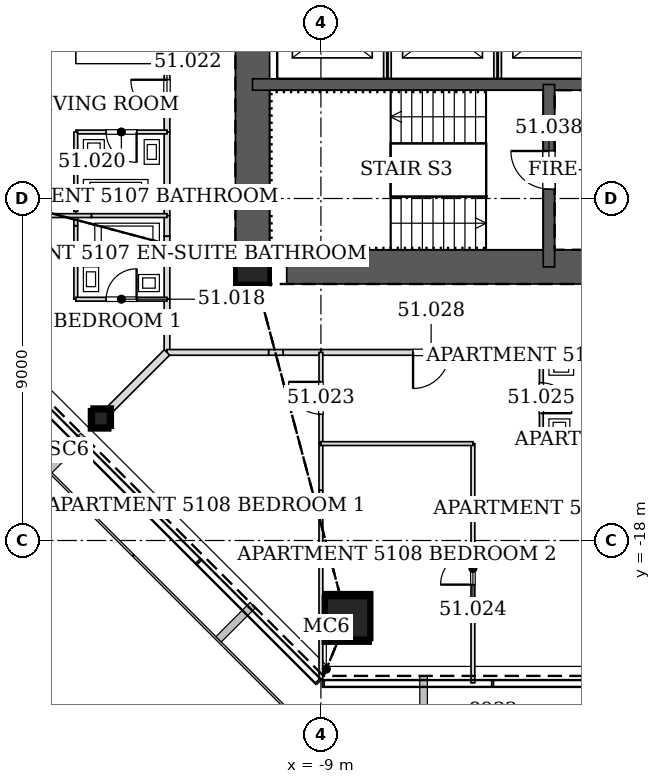
"""IFC4 building model, lengths in metres.
Left out: names, types, materials, properties, quantities, classifications, styles, units other than length and angle.
Written with IfcOpenShell. Run it as: python <this file> out.ifc"""

import sys

from ifc_helpers import new_model, si_unit, direction, frame, frame_2d, origin, origin_2d, place, context, subcontext, project, spatial, rectangle, hollow_rectangle, extrude, element, fill, save


model = new_model("IFC4")
c1 = context("Model", 3, precision=1e-05, world=origin(), true_north=direction((0.0, 1.0)))
c2 = subcontext(c1, "Body", "Model", "MODEL_VIEW")
j1 = project(units=[si_unit("LENGTHUNIT", "METRE"), si_unit("PLANEANGLEUNIT", "RADIAN")], contexts=[c1])
p1 = place(None, origin())
s1 = spatial("IfcSite", under=j1, at=p1, CompositionType="ELEMENT")
p2 = place(p1, origin())
s2 = spatial("IfcBuilding", under=s1, at=p2, CompositionType="ELEMENT")
p3 = place(p2, frame((0.0, 0.0, 221.0)))
s3 = spatial("IfcBuildingStorey", under=s2, at=p3, CompositionType="ELEMENT", Elevation=221.0)
p4 = place(p3, frame((-8.319, -20.085, 0.0), z_axis=(0.01169924247, 0.02827915051, 0.999531598986), x_axis=(-0.924045401938, 0.382282742426, 0.0)))
e1 = element("IfcColumn", 1, at=p4, inside=s3, PredefinedType="COLUMN", context=c2, shape_type="SweptSolid", body=[
    extrude(hollow_rectangle(XDim=1.2, YDim=1.2, WallThickness=0.055, at=origin_2d()), origin(), (0.0, 0.0, 1.0), 3.402),
])
p5 = place(p3, frame((-14.823, -14.823, 0.0), z_axis=(0.01995470925, 0.01995470925, 0.999601730269), x_axis=(-0.707106781187, 0.707106781187, 0.0)))
e2 = element("IfcColumn", 2, at=p5, inside=s3, PredefinedType="COLUMN", context=c2, shape_type="SweptSolid", body=[
    extrude(hollow_rectangle(XDim=0.5, YDim=0.5, WallThickness=0.025, at=origin_2d()), origin(), (0.0, 0.0, 1.0), 3.401),
])
p6 = place(p3, frame((-10.8, -10.8, 0.0), z_axis=(0.0, 0.0, 1.0), x_axis=(1.0, 0.0, 0.0)))
e3 = element("IfcColumn", 3, at=p6, inside=s3, PredefinedType="COLUMN", context=c2, shape_type="SweptSolid", body=[
    extrude(hollow_rectangle(XDim=0.9, YDim=0.9, WallThickness=0.05, at=origin_2d()), origin(), (0.0, 0.0, 1.0), 3.4),
])
p7 = place(p3, frame((-10.8, -10.8, 0.0), z_axis=(0.0, 0.0, 1.0), x_axis=(1.0, 0.0, 0.0)))
e4 = element("IfcWall", 4, at=p7, inside=s3, PredefinedType="SOLIDWALL", context=c2, shape_type="SweptSolid", body=[
    extrude(rectangle(XDim=21.6, YDim=0.9, at=frame_2d((10.8, 0.0))), origin(), (0.0, 0.0, 1.0), 3.4),
])
p8 = place(p7, frame((10.05, 0.0, 0.0)))
e5 = element("IfcOpeningElement", 5, at=p8, cuts=e4, PredefinedType="OPENING", context=c2, shape_type="SweptSolid", body=[
    extrude(rectangle(XDim=1.5, YDim=2.1, at=frame_2d((0.75, 1.05))), frame((0.0, 0.46, 0.0), z_axis=(0.0, -1.0, 0.0), x_axis=(1.0, 0.0, 0.0)), (0.0, 0.0, 1.0), 0.92),
])
p9 = place(p7, frame((17.1, 0.0, 0.0)))
e6 = element("IfcOpeningElement", 6, at=p9, cuts=e4, PredefinedType="OPENING", context=c2, shape_type="SweptSolid", body=[
    extrude(rectangle(XDim=0.9, YDim=2.1, at=frame_2d((0.45, 1.05))), frame((0.0, 0.46, 0.0), z_axis=(0.0, -1.0, 0.0), x_axis=(1.0, 0.0, 0.0)), (0.0, 0.0, 1.0), 0.92),
])
p10 = place(p3, frame((-10.8, 10.8, 0.0), z_axis=(0.0, 0.0, 1.0), x_axis=(0.0, -1.0, 0.0)))
e7 = element("IfcWall", 7, at=p10, inside=s3, PredefinedType="SOLIDWALL", context=c2, shape_type="SweptSolid", body=[
    extrude(rectangle(XDim=21.6, YDim=0.9, at=frame_2d((10.8, 0.0))), origin(), (0.0, 0.0, 1.0), 3.4),
])
p11 = place(p10, frame((8.7, 0.0, 0.0)))
e8 = element("IfcOpeningElement", 8, at=p11, cuts=e7, PredefinedType="OPENING", context=c2, shape_type="SweptSolid", body=[
    extrude(rectangle(XDim=1.2, YDim=2.1, at=frame_2d((0.6, 1.05))), frame((0.0, 0.46, 0.0), z_axis=(0.0, -1.0, 0.0), x_axis=(1.0, 0.0, 0.0)), (0.0, 0.0, 1.0), 0.92),
])
p12 = place(p10, frame((11.7, 0.0, 0.0)))
e9 = element("IfcOpeningElement", 9, at=p12, cuts=e7, PredefinedType="OPENING", context=c2, shape_type="SweptSolid", body=[
    extrude(rectangle(XDim=1.2, YDim=2.1, at=frame_2d((0.6, 1.05))), frame((0.0, 0.46, 0.0), z_axis=(0.0, -1.0, 0.0), x_axis=(1.0, 0.0, 0.0)), (0.0, 0.0, 1.0), 0.92),
])
p13 = place(p3, frame((-10.8, -6.0, 0.0), z_axis=(0.0, 0.0, 1.0), x_axis=(1.0, 0.0, 0.0)))
e10 = element("IfcWall", 10, at=p13, inside=s3, PredefinedType="SOLIDWALL", context=c2, shape_type="SweptSolid", body=[
    extrude(rectangle(XDim=21.6, YDim=0.3, at=frame_2d((10.8, 0.0))), origin(), (0.0, 0.0, 1.0), 3.4),
])
p14 = place(p13, frame((10.25, 0.0, 0.0)))
e11 = element("IfcOpeningElement", 11, at=p14, cuts=e10, PredefinedType="OPENING", context=c2, shape_type="SweptSolid", body=[
    extrude(rectangle(XDim=1.1, YDim=2.1, at=frame_2d((0.55, 1.05))), frame((0.0, 0.16, 0.0), z_axis=(0.0, -1.0, 0.0), x_axis=(1.0, 0.0, 0.0)), (0.0, 0.0, 1.0), 0.32),
])
p15 = place(p3, frame((-3.0, -6.0, 0.0), z_axis=(0.0, 0.0, 1.0), x_axis=(0.0, -1.0, 0.0)))
e12 = element("IfcWall", 12, at=p15, inside=s3, PredefinedType="SOLIDWALL", context=c2, shape_type="SweptSolid", body=[
    extrude(rectangle(XDim=4.8, YDim=0.3, at=frame_2d((2.4, 0.0))), origin(), (0.0, 0.0, 1.0), 3.4),
])
p16 = place(p15, frame((1.75, 0.0, 0.0)))
e13 = element("IfcOpeningElement", 13, at=p16, cuts=e12, PredefinedType="OPENING", context=c2, shape_type="SweptSolid", body=[
    extrude(rectangle(XDim=1.0, YDim=2.1, at=frame_2d((0.5, 1.05))), frame((0.0, 0.16, 0.0), z_axis=(0.0, -1.0, 0.0), x_axis=(1.0, 0.0, 0.0)), (0.0, 0.0, 1.0), 0.32),
])
p17 = place(p3, frame((-13.05, -9.449, 0.0), z_axis=(0.0, 0.0, 1.0), x_axis=(0.0, -1.0, 0.0)))
e14 = element("IfcWall", 14, at=p17, inside=s3, PredefinedType="PARTITIONING", context=c2, shape_type="SweptSolid", body=[
    extrude(rectangle(XDim=0.546, YDim=0.15, at=frame_2d((0.273, 0.0))), origin(), (0.0, 0.0, 1.0), 3.2),
])
p18 = place(p3, frame((-13.05, -10.373, 0.0), z_axis=(0.0, 0.0, 1.0), x_axis=(0.0, -1.0, 0.0)))
e15 = element("IfcWall", 15, at=p18, inside=s3, PredefinedType="PARTITIONING", context=c2, shape_type="SweptSolid", body=[
    extrude(rectangle(XDim=1.278, YDim=0.15, at=frame_2d((0.639, 0.0))), origin(), (0.0, 0.0, 1.0), 3.2),
])
p19 = place(p3, frame((-13.05, -9.995, 0.0), z_axis=(0.0, 0.0, 1.0), x_axis=(0.0, -1.0, 0.0)))
e16 = element("IfcWall", 16, at=p19, inside=s3, PredefinedType="PARTITIONING", context=c2, shape_type="SweptSolid", body=[
    extrude(rectangle(XDim=0.378, YDim=0.15, at=frame_2d((0.189, 0.0))), origin(), (0.0, 0.0, 1.0), 2.268),
])
p20 = place(p3, frame((-13.05, -11.649, 0.0), z_axis=(0.0, 0.0, 1.0), x_axis=(0.0, -1.0, 0.0)))
e17 = element("IfcWall", 17, at=p20, inside=s3, PredefinedType="PARTITIONING", context=c2, shape_type="SweptSolid", body=[
    extrude(rectangle(XDim=1.401, YDim=0.15, at=frame_2d((0.701, 0.0))), origin(), (0.0, 0.0, 1.0), 2.578),
])
p21 = place(p3, frame((-13.05, -7.249, 0.0), z_axis=(0.0, 0.0, 1.0), x_axis=(0.0, -1.0, 0.0)))
e18 = element("IfcWall", 18, at=p21, inside=s3, PredefinedType="PARTITIONING", context=c2, shape_type="SweptSolid", body=[
    extrude(rectangle(XDim=2.202, YDim=0.15, at=frame_2d((1.101, 0.0))), origin(), (0.0, 0.0, 1.0), 3.2),
])
p22 = place(p3, frame((-13.05, -3.649, 0.0), z_axis=(0.0, 0.0, 1.0), x_axis=(0.0, -1.0, 0.0)))
e19 = element("IfcWall", 19, at=p22, inside=s3, PredefinedType="PARTITIONING", context=c2, shape_type="SweptSolid", body=[
    extrude(rectangle(XDim=1.802, YDim=0.15, at=frame_2d((0.901, 0.0))), origin(), (0.0, 0.0, 1.0), 3.2),
])
p23 = place(p3, frame((-13.05, -5.449, 0.0), z_axis=(0.0, 0.0, 1.0), x_axis=(0.0, -1.0, 0.0)))
e20 = element("IfcWall", 20, at=p23, inside=s3, PredefinedType="PARTITIONING", context=c2, shape_type="SweptSolid", body=[
    extrude(rectangle(XDim=1.802, YDim=0.15, at=frame_2d((0.901, 0.0))), origin(), (0.0, 0.0, 1.0), 3.2),
])
p24 = place(p23, frame((0.426, 0.0, 0.0)))
e21 = element("IfcOpeningElement", 21, at=p24, cuts=e20, PredefinedType="OPENING", context=c2, shape_type="SweptSolid", body=[
    extrude(rectangle(XDim=0.95, YDim=2.1, at=frame_2d((0.475, 1.05))), frame((0.0, 0.085, 0.0), z_axis=(0.0, -1.0, 0.0), x_axis=(1.0, 0.0, 0.0)), (0.0, 0.0, 1.0), 0.17),
])
p25 = place(p3, frame((-13.05, -13.05, 0.0), z_axis=(0.0, 0.0, 1.0), x_axis=(1.0, 0.0, 0.0)))
e22 = element("IfcWall", 22, at=p25, inside=s3, PredefinedType="PARTITIONING", context=c2, shape_type="SweptSolid", body=[
    extrude(rectangle(XDim=2.677, YDim=0.15, at=frame_2d((1.339, 0.0))), origin(), (0.0, 0.0, 1.0), 2.578),
])
p26 = place(p3, frame((-9.995, -13.05, 0.0), z_axis=(0.0, 0.0, 1.0), x_axis=(1.0, 0.0, 0.0)))
e23 = element("IfcWall", 23, at=p26, inside=s3, PredefinedType="PARTITIONING", context=c2, shape_type="SweptSolid", body=[
    extrude(rectangle(XDim=0.996, YDim=0.15, at=frame_2d((0.498, 0.0))), origin(), (0.0, 0.0, 1.0), 3.2),
])
p27 = place(p3, frame((-10.373, -13.05, 0.0), z_axis=(0.0, 0.0, 1.0), x_axis=(1.0, 0.0, 0.0)))
e24 = element("IfcWall", 24, at=p27, inside=s3, PredefinedType="PARTITIONING", context=c2, shape_type="SweptSolid", body=[
    extrude(rectangle(XDim=0.378, YDim=0.15, at=frame_2d((0.189, 0.0))), origin(), (0.0, 0.0, 1.0), 2.268),
])
p28 = place(p3, frame((-3.201, -13.05, 0.0), z_axis=(0.0, 0.0, 1.0), x_axis=(1.0, 0.0, 0.0)))
e25 = element("IfcWall", 25, at=p28, inside=s3, PredefinedType="PARTITIONING", context=c2, shape_type="SweptSolid", body=[
    extrude(rectangle(XDim=2.202, YDim=0.15, at=frame_2d((1.101, 0.0))), origin(), (0.0, 0.0, 1.0), 3.2),
])
p29 = place(p3, frame((-9.001, -13.05, 0.0), z_axis=(0.0, 0.0, 1.0), x_axis=(1.0, 0.0, 0.0)))
e26 = element("IfcWall", 26, at=p29, inside=s3, PredefinedType="PARTITIONING", context=c2, shape_type="SweptSolid", body=[
    extrude(rectangle(XDim=5.802, YDim=0.15, at=frame_2d((2.901, 0.0))), origin(), (0.0, 0.0, 1.0), 3.2),
])
p30 = place(p29, frame((2.426, 0.0, 0.0)))
e27 = element("IfcOpeningElement", 27, at=p30, cuts=e26, PredefinedType="OPENING", context=c2, shape_type="SweptSolid", body=[
    extrude(rectangle(XDim=0.95, YDim=2.1, at=frame_2d((0.475, 1.05))), frame((0.0, 0.085, 0.0), z_axis=(0.0, -1.0, 0.0), x_axis=(1.0, 0.0, 0.0)), (0.0, 0.0, 1.0), 0.17),
])
p31 = place(p3, frame((-15.45, -9.716, 0.0), z_axis=(0.0, 0.0, 1.0), x_axis=(0.0, -1.0, 0.0)))
e28 = element("IfcWall", 28, at=p31, inside=s3, PredefinedType="PARTITIONING", context=c2, shape_type="SweptSolid", body=[
    extrude(rectangle(XDim=1.934, YDim=0.1, at=frame_2d((0.967, 0.0))), origin(), (0.0, 0.0, 1.0), 2.786),
])
p32 = place(p3, frame((-15.45, -9.45, 0.0), z_axis=(0.0, 0.0, 1.0), x_axis=(0.0, -1.0, 0.0)))
e29 = element("IfcWall", 29, at=p32, inside=s3, PredefinedType="PARTITIONING", context=c2, shape_type="SweptSolid", body=[
    extrude(rectangle(XDim=0.266, YDim=0.1, at=frame_2d((0.133, 0.0))), origin(), (0.0, 0.0, 1.0), 2.268),
])
p33 = place(p3, frame((-15.45, -11.65, 0.0), z_axis=(0.0, 0.0, 1.0), x_axis=(1.0, 0.0, 0.0)))
e30 = element("IfcWall", 30, at=p33, inside=s3, PredefinedType="PARTITIONING", context=c2, shape_type="SweptSolid", body=[
    extrude(rectangle(XDim=2.4, YDim=0.1, at=frame_2d((1.2, 0.0))), origin(), (0.0, 0.0, 1.0), 2.786),
])
p34 = place(p33, frame((0.8, 0.0, 0.0)))
e31 = element("IfcOpeningElement", 31, at=p34, cuts=e30, PredefinedType="OPENING", context=c2, shape_type="SweptSolid", body=[
    extrude(rectangle(XDim=0.8, YDim=2.1, at=frame_2d((0.4, 1.05))), frame((0.0, 0.06, 0.0), z_axis=(0.0, -1.0, 0.0), x_axis=(1.0, 0.0, 0.0)), (0.0, 0.0, 1.0), 0.12),
])
p35 = place(p3, frame((-13.05, -9.45, 0.0), z_axis=(0.0, 0.0, 1.0), x_axis=(-1.0, 0.0, 0.0)))
e32 = element("IfcWall", 32, at=p35, inside=s3, PredefinedType="PARTITIONING", context=c2, shape_type="SweptSolid", body=[
    extrude(rectangle(XDim=1.989, YDim=0.1, at=frame_2d((0.994, 0.0))), origin(), (0.0, 0.0, 1.0), 2.591),
])
p36 = place(p3, frame((-15.039, -9.45, 0.0), z_axis=(0.0, 0.0, 1.0), x_axis=(-1.0, 0.0, 0.0)))
e33 = element("IfcWall", 33, at=p36, inside=s3, PredefinedType="PARTITIONING", context=c2, shape_type="SweptSolid", body=[
    extrude(rectangle(XDim=1.381, YDim=0.1, at=frame_2d((0.69, 0.0))), origin(), (0.0, 0.0, 1.0), 2.268),
])
p37 = place(p3, frame((-14.565, -14.565, 0.0), z_axis=(0.0, 0.0, 1.0), x_axis=(0.707106781187, 0.707106781187, 0.0)))
e34 = element("IfcWall", 34, at=p37, inside=s3, PredefinedType="PARTITIONING", context=c2, shape_type="SweptSolid", body=[
    extrude(rectangle(XDim=2.142, YDim=0.2, at=frame_2d((1.071, 0.0))), origin(), (0.0, 0.0, 1.0), 2.578),
])
p38 = place(p3, frame((-13.05, -7.25, 0.0), z_axis=(0.0, 0.0, 1.0), x_axis=(-1.0, 0.0, 0.0)))
e35 = element("IfcWall", 35, at=p38, inside=s3, PredefinedType="PARTITIONING", context=c2, shape_type="SweptSolid", body=[
    extrude(rectangle(XDim=2.4, YDim=0.1, at=frame_2d((1.2, 0.0))), origin(), (0.0, 0.0, 1.0), 2.591),
])
p39 = place(p38, frame((0.8, 0.0, 0.0)))
e36 = element("IfcOpeningElement", 36, at=p39, cuts=e35, PredefinedType="OPENING", context=c2, shape_type="SweptSolid", body=[
    extrude(rectangle(XDim=0.8, YDim=2.1, at=frame_2d((0.4, 1.05))), frame((0.0, 0.06, 0.0), z_axis=(0.0, -1.0, 0.0), x_axis=(1.0, 0.0, 0.0)), (0.0, 0.0, 1.0), 0.12),
])
p40 = place(p3, frame((-15.45, -7.25, 0.0), z_axis=(0.0, 0.0, 1.0), x_axis=(0.0, -1.0, 0.0)))
e37 = element("IfcWall", 37, at=p40, inside=s3, PredefinedType="PARTITIONING", context=c2, shape_type="SweptSolid", body=[
    extrude(rectangle(XDim=2.087, YDim=0.1, at=frame_2d((1.044, 0.0))), origin(), (0.0, 0.0, 1.0), 3.2),
])
p41 = place(p3, frame((-9.0, -21.645, 0.0), z_axis=(0.0, 0.0, 1.0), x_axis=(0.0, 1.0, 0.0)))
e38 = element("IfcWall", 38, at=p41, inside=s3, PredefinedType="PARTITIONING", context=c2, shape_type="SweptSolid", body=[
    extrude(rectangle(XDim=1.172, YDim=0.1, at=frame_2d((0.586, 0.0))), origin(), (0.0, 0.0, 1.0), 3.2),
])
p42 = place(p3, frame((-9.0, -20.11, 0.0), z_axis=(0.0, 0.0, 1.0), x_axis=(0.0, 1.0, 0.0)))
e39 = element("IfcWall", 39, at=p42, inside=s3, PredefinedType="PARTITIONING", context=c2, shape_type="SweptSolid", body=[
    extrude(rectangle(XDim=2.048, YDim=0.1, at=frame_2d((1.024, 0.0))), origin(), (0.0, 0.0, 1.0), 2.784),
])
p43 = place(p3, frame((-9.0, -16.682, 0.0), z_axis=(0.0, 0.0, 1.0), x_axis=(0.0, 1.0, 0.0)))
e40 = element("IfcWall", 40, at=p43, inside=s3, PredefinedType="PARTITIONING", context=c2, shape_type="SweptSolid", body=[
    extrude(rectangle(XDim=1.233, YDim=0.1, at=frame_2d((0.616, 0.0))), origin(), (0.0, 0.0, 1.0), 2.664),
])
p44 = place(p3, frame((-9.0, -18.063, 0.0), z_axis=(0.0, 0.0, 1.0), x_axis=(0.0, 1.0, 0.0)))
e41 = element("IfcWall", 41, at=p44, inside=s3, PredefinedType="PARTITIONING", context=c2, shape_type="SweptSolid", body=[
    extrude(rectangle(XDim=1.381, YDim=0.1, at=frame_2d((0.69, 0.0))), origin(), (0.0, 0.0, 1.0), 2.268),
])
p45 = place(p3, frame((-9.0, -15.451, 0.0), z_axis=(0.0, 0.0, 1.0), x_axis=(0.0, 1.0, 0.0)))
e42 = element("IfcWall", 42, at=p45, inside=s3, PredefinedType="PARTITIONING", context=c2, shape_type="SweptSolid", body=[
    extrude(rectangle(XDim=2.401, YDim=0.1, at=frame_2d((1.2, 0.0))), origin(), (0.0, 0.0, 1.0), 2.591),
])
p46 = place(p45, frame((0.775, 0.0, 0.0)))
e43 = element("IfcOpeningElement", 43, at=p46, cuts=e42, PredefinedType="OPENING", context=c2, shape_type="SweptSolid", body=[
    extrude(rectangle(XDim=0.85, YDim=2.1, at=frame_2d((0.425, 1.05))), frame((0.0, 0.06, 0.0), z_axis=(0.0, -1.0, 0.0), x_axis=(1.0, 0.0, 0.0)), (0.0, 0.0, 1.0), 0.12),
])
p47 = place(p3, frame((-5.0, -21.747, 0.0), z_axis=(0.0, 0.0, 1.0), x_axis=(0.0, 1.0, 0.0)))
e44 = element("IfcWall", 44, at=p47, inside=s3, PredefinedType="PARTITIONING", context=c2, shape_type="SweptSolid", body=[
    extrude(rectangle(XDim=6.297, YDim=0.1, at=frame_2d((3.148, 0.0))), origin(), (0.0, 0.0, 1.0), 2.591),
])
p48 = place(p47, frame((2.585, 0.0, 0.0)))
e45 = element("IfcOpeningElement", 45, at=p48, cuts=e44, PredefinedType="OPENING", context=c2, shape_type="SweptSolid", body=[
    extrude(rectangle(XDim=0.85, YDim=2.1, at=frame_2d((0.425, 1.05))), frame((0.0, 0.06, 0.0), z_axis=(0.0, -1.0, 0.0), x_axis=(1.0, 0.0, 0.0)), (0.0, 0.0, 1.0), 0.12),
])
p49 = place(p3, frame((-5.0, -15.45, 0.0), z_axis=(0.0, 0.0, 1.0), x_axis=(-1.0, 0.0, 0.0)))
e46 = element("IfcWall", 46, at=p49, inside=s3, PredefinedType="PARTITIONING", context=c2, shape_type="SweptSolid", body=[
    extrude(rectangle(XDim=4.0, YDim=0.1, at=frame_2d((2.0, 0.0))), origin(), (0.0, 0.0, 1.0), 3.2),
])
p50 = place(p3, frame((-3.2, -13.05, 0.0), z_axis=(0.0, 0.0, 1.0), x_axis=(0.0, -1.0, 0.0)))
e47 = element("IfcWall", 47, at=p50, inside=s3, PredefinedType="PARTITIONING", context=c2, shape_type="SweptSolid", body=[
    extrude(rectangle(XDim=2.4, YDim=0.1, at=frame_2d((1.2, 0.0))), origin(), (0.0, 0.0, 1.0), 2.591),
])
p51 = place(p50, frame((0.8, 0.0, 0.0)))
e48 = element("IfcOpeningElement", 48, at=p51, cuts=e47, PredefinedType="OPENING", context=c2, shape_type="SweptSolid", body=[
    extrude(rectangle(XDim=0.8, YDim=2.1, at=frame_2d((0.4, 1.05))), frame((0.0, 0.06, 0.0), z_axis=(0.0, -1.0, 0.0), x_axis=(1.0, 0.0, 0.0)), (0.0, 0.0, 1.0), 0.12),
])
p52 = place(p3, frame((-3.2, -15.45, 0.0), z_axis=(0.0, 0.0, 1.0), x_axis=(1.0, 0.0, 0.0)))
e49 = element("IfcWall", 49, at=p52, inside=s3, PredefinedType="PARTITIONING", context=c2, shape_type="SweptSolid", body=[
    extrude(rectangle(XDim=2.2, YDim=0.1, at=frame_2d((1.1, 0.0))), origin(), (0.0, 0.0, 1.0), 3.2),
])
for number, where, z_axis, x_axis in (
    (50, (-7.25, -5.85, 0.0), (0.0, 0.0, 1.0), (0.0, 1.0, 0.0)),
    (51, (-4.35, -5.85, 0.0), (0.0, 0.0, 1.0), (0.0, 1.0, 0.0)),
):
    element("IfcWall", number, at=place(p3, frame(where, z_axis=z_axis, x_axis=x_axis)), inside=s3, PredefinedType="PARTITIONING", context=c2, shape_type="SweptSolid", body=[
        extrude(rectangle(XDim=2.7, YDim=0.2, at=frame_2d((1.35, 0.0))), origin(), (0.0, 0.0, 1.0), 3.4),
    ])
p53 = place(p34, origin())
e52 = element("IfcDoor", 52, at=p53, inside=s3, OperationType="SINGLE_SWING_RIGHT", PredefinedType="DOOR", context=c2, shape_type="SweptSolid", body=[
    extrude(rectangle(XDim=0.8, YDim=2.1, at=frame_2d((0.4, 1.05))), frame((0.0, 0.025, 0.0), z_axis=(0.0, -1.0, 0.0), x_axis=(1.0, 0.0, 0.0)), (0.0, 0.0, 1.0), 0.05),
])
fill(e31, e52)
p54 = place(p39, origin())
e53 = element("IfcDoor", 53, at=p54, inside=s3, OperationType="SINGLE_SWING_LEFT", PredefinedType="DOOR", context=c2, shape_type="SweptSolid", body=[
    extrude(rectangle(XDim=0.8, YDim=2.1, at=frame_2d((0.4, 1.05))), frame((0.0, 0.025, 0.0), z_axis=(0.0, -1.0, 0.0), x_axis=(1.0, 0.0, 0.0)), (0.0, 0.0, 1.0), 0.05),
])
fill(e36, e53)
p55 = place(p24, frame((0.95, 0.0, 0.0), z_axis=(0.0, 0.0, 1.0), x_axis=(-1.0, 0.0, 0.0)))
e54 = element("IfcDoor", 54, at=p55, inside=s3, OperationType="SINGLE_SWING_RIGHT", PredefinedType="DOOR", context=c2, shape_type="SweptSolid", body=[
    extrude(rectangle(XDim=0.95, YDim=2.1, at=frame_2d((0.475, 1.05))), frame((0.0, 0.025, 0.0), z_axis=(0.0, -1.0, 0.0), x_axis=(1.0, 0.0, 0.0)), (0.0, 0.0, 1.0), 0.05),
])
fill(e21, e54)
p56 = place(p46, origin())
e55 = element("IfcDoor", 55, at=p56, inside=s3, OperationType="SINGLE_SWING_RIGHT", PredefinedType="DOOR", context=c2, shape_type="SweptSolid", body=[
    extrude(rectangle(XDim=0.85, YDim=2.1, at=frame_2d((0.425, 1.05))), frame((0.0, 0.025, 0.0), z_axis=(0.0, -1.0, 0.0), x_axis=(1.0, 0.0, 0.0)), (0.0, 0.0, 1.0), 0.05),
])
fill(e43, e55)
p57 = place(p48, origin())
e56 = element("IfcDoor", 56, at=p57, inside=s3, OperationType="SINGLE_SWING_LEFT", PredefinedType="DOOR", context=c2, shape_type="SweptSolid", body=[
    extrude(rectangle(XDim=0.85, YDim=2.1, at=frame_2d((0.425, 1.05))), frame((0.0, 0.025, 0.0), z_axis=(0.0, -1.0, 0.0), x_axis=(1.0, 0.0, 0.0)), (0.0, 0.0, 1.0), 0.05),
])
fill(e45, e56)
p58 = place(p51, origin())
e57 = element("IfcDoor", 57, at=p58, inside=s3, OperationType="SINGLE_SWING_RIGHT", PredefinedType="DOOR", context=c2, shape_type="SweptSolid", body=[
    extrude(rectangle(XDim=0.8, YDim=2.1, at=frame_2d((0.4, 1.05))), frame((0.0, 0.025, 0.0), z_axis=(0.0, -1.0, 0.0), x_axis=(1.0, 0.0, 0.0)), (0.0, 0.0, 1.0), 0.05),
])
fill(e48, e57)
p59 = place(p30, frame((0.95, 0.0, 0.0), z_axis=(0.0, 0.0, 1.0), x_axis=(-1.0, 0.0, 0.0)))
e58 = element("IfcDoor", 58, at=p59, inside=s3, OperationType="SINGLE_SWING_RIGHT", PredefinedType="DOOR", context=c2, shape_type="SweptSolid", body=[
    extrude(rectangle(XDim=0.95, YDim=2.1, at=frame_2d((0.475, 1.05))), frame((0.0, 0.025, 0.0), z_axis=(0.0, -1.0, 0.0), x_axis=(1.0, 0.0, 0.0)), (0.0, 0.0, 1.0), 0.05),
])
fill(e27, e58)
p60 = place(p16, frame((1.0, 0.0, 0.0), z_axis=(0.0, 0.0, 1.0), x_axis=(-1.0, 0.0, 0.0)))
e59 = element("IfcDoor", 59, at=p60, inside=s3, OperationType="SINGLE_SWING_RIGHT", PredefinedType="DOOR", context=c2, shape_type="SweptSolid", body=[
    extrude(rectangle(XDim=1.0, YDim=2.1, at=frame_2d((0.5, 1.05))), frame((0.0, 0.025, 0.0), z_axis=(0.0, -1.0, 0.0), x_axis=(1.0, 0.0, 0.0)), (0.0, 0.0, 1.0), 0.05),
])
fill(e13, e59)
save(model, sys.argv[1])
